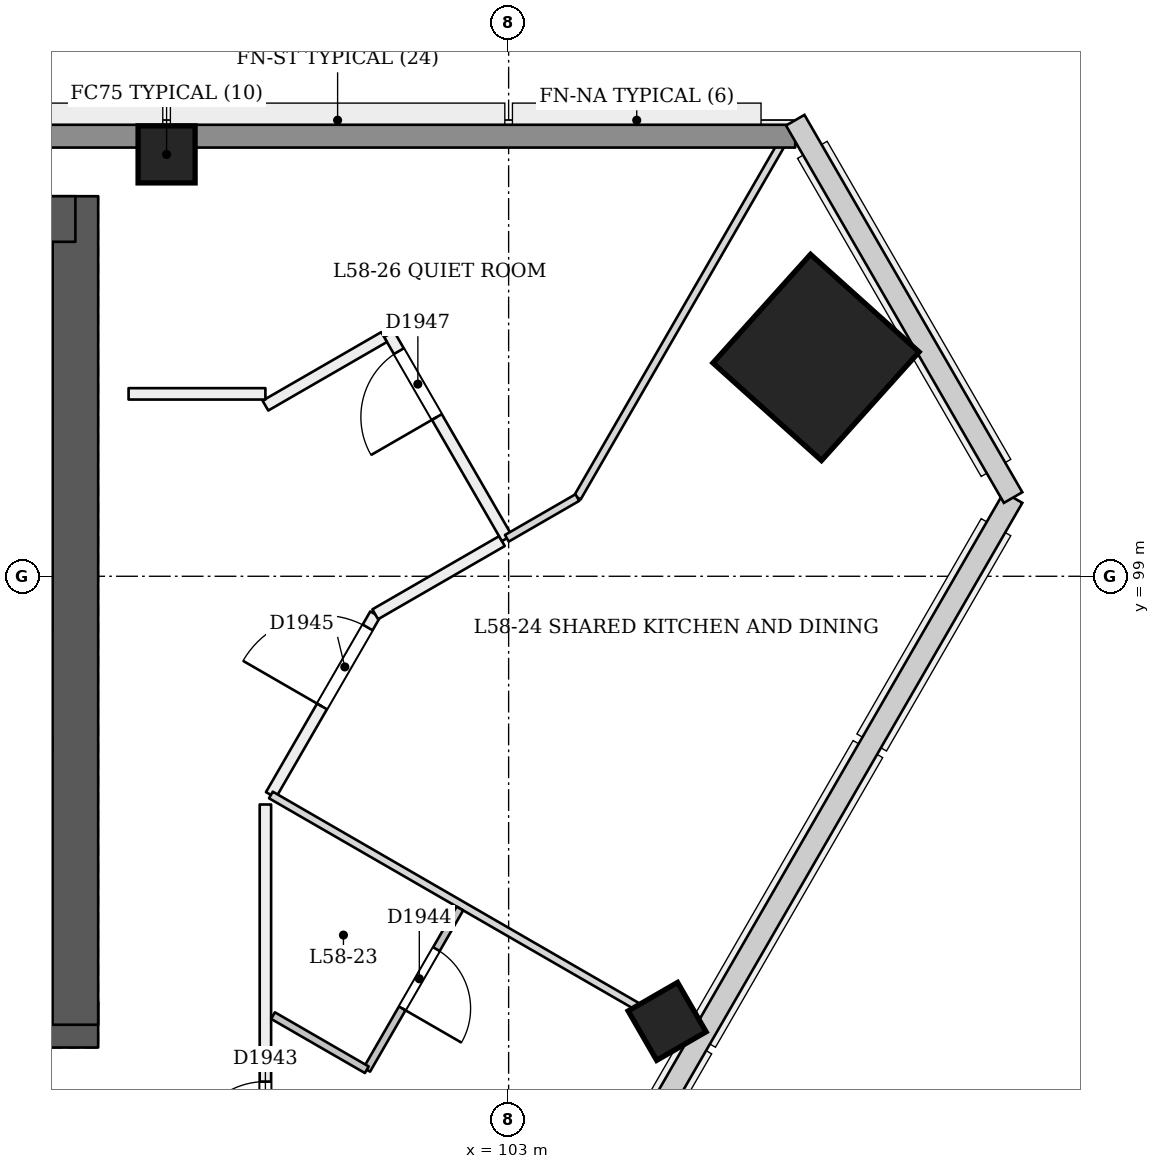
"""IFC4 building model, lengths in metres.
Left out: names, types, materials, properties, quantities, classifications, styles, units other than length and angle.
Written with IfcOpenShell. Run it as: python <this file> out.ifc"""

import sys

from ifc_helpers import new_model, si_unit, direction, frame, frame_2d, origin, origin_2d, place, context, subcontext, project, spatial, rectangle, extrude, element, fill, save


model = new_model("IFC4")
c1 = context("Model", 3, precision=1e-05, world=origin(), true_north=direction((0.0, 1.0)))
c2 = subcontext(c1, "Body", "Model", "MODEL_VIEW")
j1 = project(units=[si_unit("LENGTHUNIT", "METRE"), si_unit("PLANEANGLEUNIT", "RADIAN")], contexts=[c1])
p1 = place(None, origin())
s1 = spatial("IfcSite", under=j1, at=p1, CompositionType="ELEMENT")
p2 = place(p1, origin())
s2 = spatial("IfcBuilding", under=s1, at=p2, CompositionType="ELEMENT")
p3 = place(p2, frame((0.0, 0.0, 226.6)))
s3 = spatial("IfcBuildingStorey", under=s2, at=p3, CompositionType="ELEMENT", Elevation=226.6)
p4 = place(p3, frame((72.7, 93.1, 0.0), z_axis=(0.0, 0.0, 1.0), x_axis=(1.0, 0.0, 0.0)))
e1 = element("IfcWall", 1, at=p4, inside=s3, PredefinedType="SHEAR", context=c2, shape_type="SweptSolid", body=[
    extrude(rectangle(XDim=24.9, YDim=0.6, at=frame_2d((12.45, 0.0))), origin(), (0.0, 0.0, 1.0), 3.6),
])
p5 = place(p4, frame((1.1, 0.0, 0.0)))
e2 = element("IfcOpeningElement", 2, at=p5, cuts=e1, PredefinedType="OPENING", context=c2, shape_type="SweptSolid", body=[
    extrude(rectangle(XDim=1.2, YDim=2.1, at=frame_2d((0.6, 1.05))), frame((0.0, 0.311, 0.0), z_axis=(0.0, -1.0, 0.0), x_axis=(1.0, 0.0, 0.0)), (0.0, 0.0, 1.0), 0.621),
])
p6 = place(p4, frame((3.3, 0.0, 0.0)))
e3 = element("IfcOpeningElement", 3, at=p6, cuts=e1, PredefinedType="OPENING", context=c2, shape_type="SweptSolid", body=[
    extrude(rectangle(XDim=1.2, YDim=2.1, at=frame_2d((0.6, 1.05))), frame((0.0, 0.311, 0.0), z_axis=(0.0, -1.0, 0.0), x_axis=(1.0, 0.0, 0.0)), (0.0, 0.0, 1.0), 0.621),
])
p7 = place(p4, frame((13.3, 0.0, 0.0)))
e4 = element("IfcOpeningElement", 4, at=p7, cuts=e1, PredefinedType="OPENING", context=c2, shape_type="SweptSolid", body=[
    extrude(rectangle(XDim=1.2, YDim=2.1, at=frame_2d((0.6, 1.05))), frame((0.0, 0.311, 0.0), z_axis=(0.0, -1.0, 0.0), x_axis=(1.0, 0.0, 0.0)), (0.0, 0.0, 1.0), 0.621),
])
p8 = place(p4, frame((15.762, 0.0, 0.0)))
e5 = element("IfcOpeningElement", 5, at=p8, cuts=e1, PredefinedType="OPENING", context=c2, shape_type="SweptSolid", body=[
    extrude(rectangle(XDim=1.0, YDim=2.1, at=frame_2d((0.5, 1.05))), frame((0.0, 0.311, 0.0), z_axis=(0.0, -1.0, 0.0), x_axis=(1.0, 0.0, 0.0)), (0.0, 0.0, 1.0), 0.621),
])
p9 = place(p4, frame((18.2, 0.0, 0.0)))
e6 = element("IfcOpeningElement", 6, at=p9, cuts=e1, PredefinedType="OPENING", context=c2, shape_type="SweptSolid", body=[
    extrude(rectangle(XDim=1.0, YDim=2.1, at=frame_2d((0.5, 1.05))), frame((0.0, 0.311, 0.0), z_axis=(0.0, -1.0, 0.0), x_axis=(1.0, 0.0, 0.0)), (0.0, 0.0, 1.0), 0.621),
])
p10 = place(p4, frame((20.55, 0.0, 0.0)))
e7 = element("IfcOpeningElement", 7, at=p10, cuts=e1, PredefinedType="OPENING", context=c2, shape_type="SweptSolid", body=[
    extrude(rectangle(XDim=1.0, YDim=2.1, at=frame_2d((0.5, 1.05))), frame((0.0, 0.311, 0.0), z_axis=(0.0, -1.0, 0.0), x_axis=(1.0, 0.0, 0.0)), (0.0, 0.0, 1.0), 0.621),
])
p11 = place(p4, frame((22.837, 0.0, 0.0)))
e8 = element("IfcOpeningElement", 8, at=p11, cuts=e1, PredefinedType="OPENING", context=c2, shape_type="SweptSolid", body=[
    extrude(rectangle(XDim=1.0, YDim=2.1, at=frame_2d((0.5, 1.05))), frame((0.0, 0.311, 0.0), z_axis=(0.0, -1.0, 0.0), x_axis=(1.0, 0.0, 0.0)), (0.0, 0.0, 1.0), 0.621),
])
p12 = place(p3, frame((97.3, 93.1, 0.0), z_axis=(0.0, 0.0, 1.0), x_axis=(0.0, 1.0, 0.0)))
e9 = element("IfcWall", 9, at=p12, inside=s3, PredefinedType="SHEAR", context=c2, shape_type="SweptSolid", body=[
    extrude(rectangle(XDim=10.9, YDim=0.6, at=frame_2d((5.45, 0.0))), origin(), (0.0, 0.0, 1.0), 3.6),
])
p13 = place(p3, frame((97.3, 103.7, 0.0), z_axis=(0.0, 0.0, 1.0), x_axis=(-1.0, 0.0, 0.0)))
e10 = element("IfcWall", 10, at=p13, inside=s3, PredefinedType="SHEAR", context=c2, shape_type="SweptSolid", body=[
    extrude(rectangle(XDim=24.9, YDim=0.6, at=frame_2d((12.45, 0.0))), origin(), (0.0, 0.0, 1.0), 3.6),
])
p14 = place(p3, frame((107.078, 101.868, 0.0), z_axis=(-0.028403721265, 0.009287135593, 0.999553389135), x_axis=(0.498883801201, -0.866383831898, 0.022226307065)))
e11 = element("IfcColumn", 11, at=p14, inside=s3, PredefinedType="COLUMN", context=c2, shape_type="SweptSolid", body=[
    extrude(rectangle(XDim=1.92, YDim=1.92, at=origin_2d()), origin(), (0.0, 0.0, 1.0), 3.602),
])
p15 = place(p3, frame((98.5, 104.55, 0.0), z_axis=(0.0, 0.0, 1.0), x_axis=(1.0, 0.0, 0.0)))
e12 = element("IfcColumn", 12, at=p15, inside=s3, PredefinedType="COLUMN", context=c2, shape_type="SweptSolid", body=[
    extrude(rectangle(XDim=0.75, YDim=0.75, at=origin_2d()), origin(), (0.0, 0.0, 1.0), 3.6),
])
p16 = place(p3, frame((105.112, 93.097, -0.023), z_axis=(-0.02215369191, 0.038413282303, 0.999016333038), x_axis=(-0.500657411499, -0.865361524829, 0.022171776144)))
e13 = element("IfcColumn", 13, at=p16, inside=s3, PredefinedType="COLUMN", context=c2, shape_type="SweptSolid", body=[
    extrude(rectangle(XDim=0.75, YDim=0.75, at=origin_2d()), origin(), (0.0, 0.0, 1.0), 3.604),
])
p17 = place(p3, frame((99.8, 90.2, 0.0), z_axis=(0.0, 0.0, 1.0), x_axis=(0.0, 1.0, 0.0)))
e14 = element("IfcWall", 14, at=p17, inside=s3, PredefinedType="PARTITIONING", context=c2, shape_type="SweptSolid", body=[
    extrude(rectangle(XDim=5.798, YDim=0.15, at=frame_2d((2.899, 0.0))), origin(), (0.0, 0.0, 1.0), 3.2),
])
p18 = place(p17, frame((1.152, 0.0, 0.0)))
e15 = element("IfcOpeningElement", 15, at=p18, cuts=e14, PredefinedType="OPENING", context=c2, shape_type="SweptSolid", body=[
    extrude(rectangle(XDim=1.0, YDim=2.1, at=frame_2d((0.5, 1.05))), frame((0.0, 0.085, 0.0), z_axis=(0.0, -1.0, 0.0), x_axis=(1.0, 0.0, 0.0)), (0.0, 0.0, 1.0), 0.171),
])
p19 = place(p3, frame((99.872, 96.123, 0.0), z_axis=(0.0, 0.0, 1.0), x_axis=(0.500061224174, 0.865990053105, 0.0)))
e16 = element("IfcWall", 16, at=p19, inside=s3, PredefinedType="PARTITIONING", context=c2, shape_type="SweptSolid", body=[
    extrude(rectangle(XDim=2.745, YDim=0.15, at=frame_2d((1.373, 0.0))), origin(), (0.0, 0.0, 1.0), 3.2),
])
p20 = place(p19, frame((1.345, 0.0, 0.0)))
e17 = element("IfcOpeningElement", 17, at=p20, cuts=e16, PredefinedType="OPENING", context=c2, shape_type="SweptSolid", body=[
    extrude(rectangle(XDim=1.2, YDim=2.1, at=frame_2d((0.6, 1.05))), frame((0.0, 0.085, 0.0), z_axis=(0.0, -1.0, 0.0), x_axis=(1.0, 0.0, 0.0)), (0.0, 0.0, 1.0), 0.171),
])
p21 = place(p3, frame((101.245, 98.5, 0.0), z_axis=(0.0, 0.0, 1.0), x_axis=(0.866033512162, 0.499985955615, 0.0)))
e18 = element("IfcWall", 18, at=p21, inside=s3, PredefinedType="PARTITIONING", context=c2, shape_type="SweptSolid", body=[
    extrude(rectangle(XDim=1.925, YDim=0.15, at=frame_2d((0.962, 0.0))), origin(), (0.0, 0.0, 1.0), 3.2),
])
p22 = place(p3, frame((102.977, 99.5, 0.0), z_axis=(0.0, 0.0, 1.0), x_axis=(-0.500026960575, 0.86600983753, 0.0)))
e19 = element("IfcWall", 19, at=p22, inside=s3, PredefinedType="PARTITIONING", context=c2, shape_type="SweptSolid", body=[
    extrude(rectangle(XDim=3.1, YDim=0.15, at=frame_2d((1.55, 0.0))), origin(), (0.0, 0.0, 1.0), 3.2),
])
p23 = place(p22, frame((1.842, 0.0, 0.0)))
e20 = element("IfcOpeningElement", 20, at=p23, cuts=e19, PredefinedType="OPENING", context=c2, shape_type="SweptSolid", body=[
    extrude(rectangle(XDim=1.0, YDim=2.1, at=frame_2d((0.5, 1.05))), frame((0.0, 0.085, 0.0), z_axis=(0.0, -1.0, 0.0), x_axis=(1.0, 0.0, 0.0)), (0.0, 0.0, 1.0), 0.171),
])
p24 = place(p3, frame((101.362, 102.147, 0.0), z_axis=(0.0, 0.0, 1.0), x_axis=(-0.865984934964, -0.500070087503, 0.0)))
e21 = element("IfcWall", 21, at=p24, inside=s3, PredefinedType="PARTITIONING", context=c2, shape_type="SweptSolid", body=[
    extrude(rectangle(XDim=1.803, YDim=0.15, at=frame_2d((0.902, 0.0))), origin(), (0.0, 0.0, 1.0), 3.2),
])
p25 = place(p3, frame((99.8, 101.4, 0.0), z_axis=(0.0, 0.0, 1.0), x_axis=(-1.0, 0.0, 0.0)))
e22 = element("IfcWall", 22, at=p25, inside=s3, PredefinedType="PARTITIONING", context=c2, shape_type="SweptSolid", body=[
    extrude(rectangle(XDim=1.8, YDim=0.15, at=frame_2d((0.9, 0.0))), origin(), (0.0, 0.0, 1.0), 3.2),
])
p26 = place(p3, frame((102.359, 94.63, 0.0), z_axis=(0.0, 0.0, 1.0), x_axis=(-0.500018594424, -0.866014668023, 0.0)))
e23 = element("IfcWall", 23, at=p26, inside=s3, PredefinedType="PARTITIONING", context=c2, shape_type="SweptSolid", body=[
    extrude(rectangle(XDim=2.45, YDim=0.1, at=frame_2d((1.225, 0.0))), origin(), (0.0, 0.0, 1.0), 3.2),
])
p27 = place(p26, frame((0.618, 0.0, 0.0)))
e24 = element("IfcOpeningElement", 24, at=p27, cuts=e23, PredefinedType="OPENING", context=c2, shape_type="SweptSolid", body=[
    extrude(rectangle(XDim=0.9, YDim=2.1, at=frame_2d((0.45, 1.05))), frame((0.0, 0.061, 0.0), z_axis=(0.0, -1.0, 0.0), x_axis=(1.0, 0.0, 0.0)), (0.0, 0.0, 1.0), 0.121),
])
p28 = place(p3, frame((101.134, 92.508, 0.0), z_axis=(0.0, 0.0, 1.0), x_axis=(-0.866020080793, 0.500009219579, 0.0)))
e25 = element("IfcWall", 25, at=p28, inside=s3, PredefinedType="PARTITIONING", context=c2, shape_type="SweptSolid", body=[
    extrude(rectangle(XDim=1.425, YDim=0.1, at=frame_2d((0.712, 0.0))), origin(), (0.0, 0.0, 1.0), 3.2),
])
p29 = place(p3, frame((105.415, 92.923, 0.0), z_axis=(0.0, 0.0, 1.0), x_axis=(-0.866018518567, 0.500011925357, 0.0)))
e26 = element("IfcWall", 26, at=p29, inside=s3, PredefinedType="PARTITIONING", context=c2, shape_type="SweptSolid", body=[
    extrude(rectangle(XDim=6.4, YDim=0.1, at=frame_2d((3.2, 0.0))), origin(), (0.0, 0.0, 1.0), 2.7),
])
p30 = place(p3, frame((106.713, 104.9, 0.0), z_axis=(0.0, 0.0, 1.0), x_axis=(-0.49999586752, -0.86602778966, 0.0)))
e27 = element("IfcWall", 27, at=p30, inside=s3, PredefinedType="PARTITIONING", context=c2, shape_type="SweptSolid", body=[
    extrude(rectangle(XDim=5.617, YDim=0.1, at=frame_2d((2.808, 0.0))), origin(), (0.0, 0.0, 1.0), 2.7),
])
p31 = place(p3, frame((103.905, 100.036, 0.0), z_axis=(0.0, 0.0, 1.0), x_axis=(-0.866018596809, -0.500011789842, 0.0)))
e28 = element("IfcWall", 28, at=p31, inside=s3, PredefinedType="PARTITIONING", context=c2, shape_type="SweptSolid", body=[
    extrude(rectangle(XDim=1.071, YDim=0.1, at=frame_2d((0.536, 0.0))), origin(), (0.0, 0.0, 1.0), 3.2),
])
p32 = place(p3, frame((63.229, 104.79, 0.0), z_axis=(0.0, 0.0, 1.0), x_axis=(1.0, 0.0, 0.0)))
e29 = element("IfcWall", 29, at=p32, inside=s3, PredefinedType="SOLIDWALL", context=c2, shape_type="SweptSolid", body=[
    extrude(rectangle(XDim=43.542, YDim=0.3, at=frame_2d((21.771, 0.0))), origin(), (0.0, 0.0, 1.0), 2.7),
])
p33 = place(p18, origin())
e30 = element("IfcDoor", 30, at=p33, inside=s3, OperationType="SINGLE_SWING_LEFT", PredefinedType="NOTDEFINED", context=c2, shape_type="SweptSolid", body=[
    extrude(rectangle(XDim=1.0, YDim=2.1, at=frame_2d((0.5, 1.05))), frame((0.0, 0.025, 0.0), z_axis=(0.0, -1.0, 0.0), x_axis=(1.0, 0.0, 0.0)), (0.0, 0.0, 1.0), 0.05),
])
fill(e15, e30)
p34 = place(p27, origin())
e31 = element("IfcDoor", 31, at=p34, inside=s3, OperationType="SINGLE_SWING_RIGHT", PredefinedType="NOTDEFINED", context=c2, shape_type="SweptSolid", body=[
    extrude(rectangle(XDim=0.9, YDim=2.1, at=frame_2d((0.45, 1.05))), frame((0.0, 0.025, 0.0), z_axis=(0.0, -1.0, 0.0), x_axis=(1.0, 0.0, 0.0)), (0.0, 0.0, 1.0), 0.05),
])
fill(e24, e31)
p35 = place(p20, origin())
e32 = element("IfcDoor", 32, at=p35, inside=s3, OperationType="SINGLE_SWING_LEFT", PredefinedType="NOTDEFINED", context=c2, shape_type="SweptSolid", body=[
    extrude(rectangle(XDim=1.2, YDim=2.1, at=frame_2d((0.6, 1.05))), frame((0.0, 0.025, 0.0), z_axis=(0.0, -1.0, 0.0), x_axis=(1.0, 0.0, 0.0)), (0.0, 0.0, 1.0), 0.05),
])
fill(e17, e32)
p36 = place(p23, origin())
e33 = element("IfcDoor", 33, at=p36, inside=s3, OperationType="SINGLE_SWING_LEFT", PredefinedType="NOTDEFINED", context=c2, shape_type="SweptSolid", body=[
    extrude(rectangle(XDim=1.0, YDim=2.1, at=frame_2d((0.5, 1.05))), frame((0.0, 0.025, 0.0), z_axis=(0.0, -1.0, 0.0), x_axis=(1.0, 0.0, 0.0)), (0.0, 0.0, 1.0), 0.05),
])
fill(e20, e33)
save(model, sys.argv[1])
